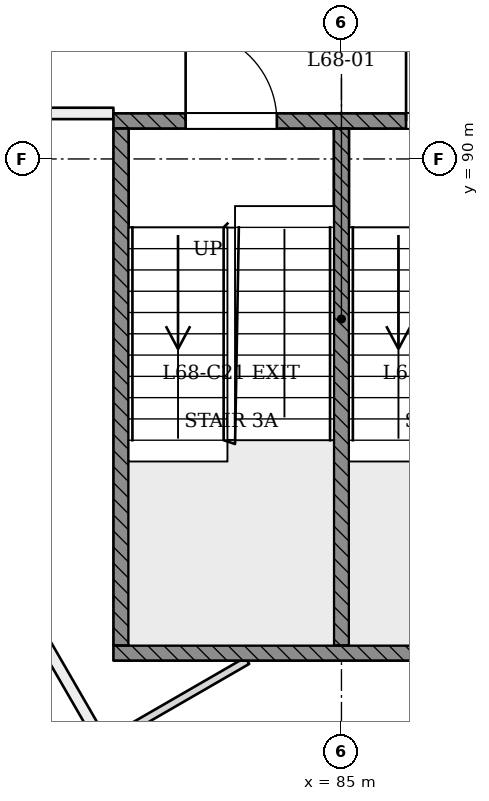
"""IFC4 building model, lengths in metres.
Left out: names, types, materials, properties, quantities, classifications, styles, units other than length and angle.
Written with IfcOpenShell. Run it as: python <this file> out.ifc"""

import sys

from ifc_helpers import new_model, si_unit, direction, frame, frame_2d, origin, place, context, subcontext, project, spatial, rectangle, extrude, element, fill, save


model = new_model("IFC4")
c1 = context("Model", 3, precision=1e-05, world=origin(), true_north=direction((0.0, 1.0)))
c2 = subcontext(c1, "Body", "Model", "MODEL_VIEW")
j1 = project(units=[si_unit("LENGTHUNIT", "METRE"), si_unit("PLANEANGLEUNIT", "RADIAN")], contexts=[c1])
p1 = place(None, origin())
s1 = spatial("IfcSite", under=j1, at=p1, CompositionType="ELEMENT")
p2 = place(p1, origin())
s2 = spatial("IfcBuilding", under=s1, at=p2, CompositionType="ELEMENT")
p3 = place(p2, frame((0.0, 0.0, 264.4)))
s3 = spatial("IfcBuildingStorey", under=s2, at=p3, CompositionType="ELEMENT", Elevation=264.4)
p4 = place(p3, frame((85.0, 76.873, 0.0), z_axis=(0.0, 0.0, 1.0), x_axis=(-0.500003770635, 0.866023226796, 0.0)))
e1 = element("IfcWall", 1, at=p4, inside=s3, PredefinedType="PARTITIONING", context=c2, shape_type="SweptSolid", body=[
    extrude(rectangle(XDim=15.851, YDim=0.15, at=frame_2d((7.926, 0.0))), origin(), (0.0, 0.0, 1.0), 3.2),
])
p5 = place(p4, frame((11.09, 0.0, 0.0)))
e2 = element("IfcOpeningElement", 2, at=p5, cuts=e1, PredefinedType="OPENING", context=c2, shape_type="SweptSolid", body=[
    extrude(rectangle(XDim=0.9, YDim=2.1, at=frame_2d((0.45, 1.05))), frame((0.0, 0.085, 0.0), z_axis=(0.0, -1.0, 0.0), x_axis=(1.0, 0.0, 0.0)), (0.0, 0.0, 1.0), 0.171),
])
p6 = place(p4, frame((3.143, 0.0, 0.0)))
e3 = element("IfcOpeningElement", 3, at=p6, cuts=e1, PredefinedType="OPENING", context=c2, shape_type="SweptSolid", body=[
    extrude(rectangle(XDim=1.0, YDim=2.1, at=frame_2d((0.5, 1.05))), frame((0.0, 0.085, 0.0), z_axis=(0.0, -1.0, 0.0), x_axis=(1.0, 0.0, 0.0)), (0.0, 0.0, 1.0), 0.171),
])
p7 = place(p3, frame((77.205, 90.6, 0.0), z_axis=(0.0, 0.0, 1.0), x_axis=(0.999999988336, -0.000152733936, 0.0)))
e4 = element("IfcWall", 4, at=p7, inside=s3, PredefinedType="PARTITIONING", context=c2, shape_type="SweptSolid", body=[
    extrude(rectangle(XDim=4.795, YDim=0.15, at=frame_2d((2.398, 0.0))), origin(), (0.0, 0.0, 1.0), 3.2),
])
p8 = place(p3, frame((92.926, 90.6, 0.0), z_axis=(0.0, 0.0, 1.0), x_axis=(-0.499998923094, -0.866026025536, 0.0)))
e5 = element("IfcWall", 5, at=p8, inside=s3, PredefinedType="PARTITIONING", context=c2, shape_type="SweptSolid", body=[
    extrude(rectangle(XDim=15.721, YDim=0.15, at=frame_2d((7.861, 0.0))), origin(), (0.0, 0.0, 1.0), 3.2),
])
p9 = place(p8, frame((3.296, 0.0, 0.0)))
e6 = element("IfcOpeningElement", 6, at=p9, cuts=e5, PredefinedType="OPENING", context=c2, shape_type="SweptSolid", body=[
    extrude(rectangle(XDim=0.9, YDim=2.1, at=frame_2d((0.45, 1.05))), frame((0.0, 0.085, 0.0), z_axis=(0.0, -1.0, 0.0), x_axis=(1.0, 0.0, 0.0)), (0.0, 0.0, 1.0), 0.171),
])
p10 = place(p3, frame((74.996, 90.6, 0.0), z_axis=(0.0, 0.0, 1.0), x_axis=(0.499997431539, -0.866026886681, 0.0)))
e7 = element("IfcWall", 7, at=p10, inside=s3, PredefinedType="PARTITIONING", context=c2, shape_type="SweptSolid", body=[
    extrude(rectangle(XDim=20.008, YDim=0.15, at=frame_2d((10.004, 0.0))), origin(), (0.0, 0.0, 1.0), 2.8),
])
p11 = place(p10, frame((3.722, 0.0, 0.0)))
e8 = element("IfcOpeningElement", 8, at=p11, cuts=e7, PredefinedType="OPENING", context=c2, shape_type="SweptSolid", body=[
    extrude(rectangle(XDim=1.0, YDim=2.1, at=frame_2d((0.5, 1.05))), frame((0.0, 0.085, 0.0), z_axis=(0.0, -1.0, 0.0), x_axis=(1.0, 0.0, 0.0)), (0.0, 0.0, 1.0), 0.171),
])
p12 = place(p10, frame((6.163, 0.0, 0.0)))
e9 = element("IfcOpeningElement", 9, at=p12, cuts=e7, PredefinedType="OPENING", context=c2, shape_type="SweptSolid", body=[
    extrude(rectangle(XDim=1.0, YDim=2.1, at=frame_2d((0.5, 1.05))), frame((0.0, 0.085, 0.0), z_axis=(0.0, -1.0, 0.0), x_axis=(1.0, 0.0, 0.0)), (0.0, 0.0, 1.0), 0.171),
])
p13 = place(p10, frame((12.838, 0.0, 0.0)))
e10 = element("IfcOpeningElement", 10, at=p13, cuts=e7, PredefinedType="OPENING", context=c2, shape_type="SweptSolid", body=[
    extrude(rectangle(XDim=1.0, YDim=2.1, at=frame_2d((0.5, 1.05))), frame((0.0, 0.085, 0.0), z_axis=(0.0, -1.0, 0.0), x_axis=(1.0, 0.0, 0.0)), (0.0, 0.0, 1.0), 0.171),
])
p14 = place(p10, frame((18.195, 0.0, 0.0)))
e11 = element("IfcOpeningElement", 11, at=p14, cuts=e7, PredefinedType="OPENING", context=c2, shape_type="SweptSolid", body=[
    extrude(rectangle(XDim=1.2, YDim=2.1, at=frame_2d((0.6, 1.05))), frame((0.0, 0.085, 0.0), z_axis=(0.0, -1.0, 0.0), x_axis=(1.0, 0.0, 0.0)), (0.0, 0.0, 1.0), 0.171),
])
p15 = place(p3, frame((85.065, 73.385, 0.0), z_axis=(0.0, 0.0, 1.0), x_axis=(0.499998874531, 0.866026053573, 0.0)))
e12 = element("IfcWall", 12, at=p15, inside=s3, PredefinedType="PARTITIONING", context=c2, shape_type="SweptSolid", body=[
    extrude(rectangle(XDim=19.878, YDim=0.15, at=frame_2d((9.939, 0.0))), origin(), (0.0, 0.0, 1.0), 2.8),
])
p16 = place(p15, frame((1.656, 0.0, 0.0)))
e13 = element("IfcOpeningElement", 13, at=p16, cuts=e12, PredefinedType="OPENING", context=c2, shape_type="SweptSolid", body=[
    extrude(rectangle(XDim=1.0, YDim=2.1, at=frame_2d((0.5, 1.05))), frame((0.0, 0.085, 0.0), z_axis=(0.0, -1.0, 0.0), x_axis=(1.0, 0.0, 0.0)), (0.0, 0.0, 1.0), 0.171),
])
p17 = place(p15, frame((10.335, 0.0, 0.0)))
e14 = element("IfcOpeningElement", 14, at=p17, cuts=e12, PredefinedType="OPENING", context=c2, shape_type="SweptSolid", body=[
    extrude(rectangle(XDim=1.2, YDim=2.1, at=frame_2d((0.6, 1.05))), frame((0.0, 0.085, 0.0), z_axis=(0.0, -1.0, 0.0), x_axis=(1.0, 0.0, 0.0)), (0.0, 0.0, 1.0), 0.171),
])
p18 = place(p15, frame((15.156, 0.0, 0.0)))
e15 = element("IfcOpeningElement", 15, at=p18, cuts=e12, PredefinedType="OPENING", context=c2, shape_type="SweptSolid", body=[
    extrude(rectangle(XDim=1.0, YDim=2.1, at=frame_2d((0.5, 1.05))), frame((0.0, 0.085, 0.0), z_axis=(0.0, -1.0, 0.0), x_axis=(1.0, 0.0, 0.0)), (0.0, 0.0, 1.0), 0.171),
])
p19 = place(p3, frame((81.929, 82.342, 0.0), z_axis=(0.0, 0.0, 1.0), x_axis=(0.866026091839, 0.499998808253, 0.0)))
e16 = element("IfcWall", 16, at=p19, inside=s3, PredefinedType="PARTITIONING", context=c2, shape_type="SweptSolid", body=[
    extrude(rectangle(XDim=2.116, YDim=0.1, at=frame_2d((1.058, 0.0))), origin(), (0.0, 0.0, 1.0), 3.2),
])
p20 = place(p3, frame((82.0, 90.5, 0.0), z_axis=(0.0, 0.0, 1.0), x_axis=(1.0, 0.0, 0.0)))
e17 = element("IfcWall", 17, at=p20, inside=s3, PredefinedType="SOLIDWALL", context=c2, shape_type="SweptSolid", body=[
    extrude(rectangle(XDim=6.0, YDim=0.2, at=frame_2d((3.0, 0.0))), origin(), (0.0, 0.0, 1.0), 3.2),
])
p21 = place(p20, frame((0.95, 0.0, 0.0)))
e18 = element("IfcOpeningElement", 18, at=p21, cuts=e17, PredefinedType="OPENING", context=c2, shape_type="SweptSolid", body=[
    extrude(rectangle(XDim=1.2, YDim=2.1, at=frame_2d((0.6, 1.05))), frame((0.0, 0.11, 0.0), z_axis=(0.0, -1.0, 0.0), x_axis=(1.0, 0.0, 0.0)), (0.0, 0.0, 1.0), 0.221),
])
p22 = place(p20, frame((3.85, 0.0, 0.0)))
e19 = element("IfcOpeningElement", 19, at=p22, cuts=e17, PredefinedType="OPENING", context=c2, shape_type="SweptSolid", body=[
    extrude(rectangle(XDim=1.2, YDim=2.1, at=frame_2d((0.6, 1.05))), frame((0.0, 0.11, 0.0), z_axis=(0.0, -1.0, 0.0), x_axis=(1.0, 0.0, 0.0)), (0.0, 0.0, 1.0), 0.221),
])
p23 = place(p3, frame((82.0, 83.5, 0.0), z_axis=(0.0, 0.0, 1.0), x_axis=(1.0, 0.0, 0.0)))
e20 = element("IfcWall", 20, at=p23, inside=s3, PredefinedType="SOLIDWALL", context=c2, shape_type="SweptSolid", body=[
    extrude(rectangle(XDim=6.0, YDim=0.2, at=frame_2d((3.0, 0.0))), origin(), (0.0, 0.0, 1.0), 3.2),
])
for number, where, z_axis, x_axis in (
    (21, (82.1, 83.6, 0.0), (0.0, 0.0, 1.0), (0.0, 1.0, 0.0)),
    (22, (85.0, 83.6, 0.0), (0.0, 0.0, 1.0), (0.0, 1.0, 0.0)),
):
    element("IfcWall", number, at=place(p3, frame(where, z_axis=z_axis, x_axis=x_axis)), inside=s3, PredefinedType="SOLIDWALL", context=c2, shape_type="SweptSolid", body=[
        extrude(rectangle(XDim=6.8, YDim=0.2, at=frame_2d((3.4, 0.0))), origin(), (0.0, 0.0, 1.0), 3.2),
    ])
p24 = place(p21, origin())
e23 = element("IfcDoor", 23, at=p24, inside=s3, OperationType="SINGLE_SWING_LEFT", PredefinedType="NOTDEFINED", context=c2, shape_type="SweptSolid", body=[
    extrude(rectangle(XDim=1.2, YDim=2.1, at=frame_2d((0.6, 1.05))), frame((0.0, 0.025, 0.0), z_axis=(0.0, -1.0, 0.0), x_axis=(1.0, 0.0, 0.0)), (0.0, 0.0, 1.0), 0.05),
])
fill(e18, e23)
p25 = place(p22, origin())
e24 = element("IfcDoor", 24, at=p25, inside=s3, OperationType="SINGLE_SWING_LEFT", PredefinedType="NOTDEFINED", context=c2, shape_type="SweptSolid", body=[
    extrude(rectangle(XDim=1.2, YDim=2.1, at=frame_2d((0.6, 1.05))), frame((0.0, 0.025, 0.0), z_axis=(0.0, -1.0, 0.0), x_axis=(1.0, 0.0, 0.0)), (0.0, 0.0, 1.0), 0.05),
])
fill(e19, e24)
save(model, sys.argv[1])
